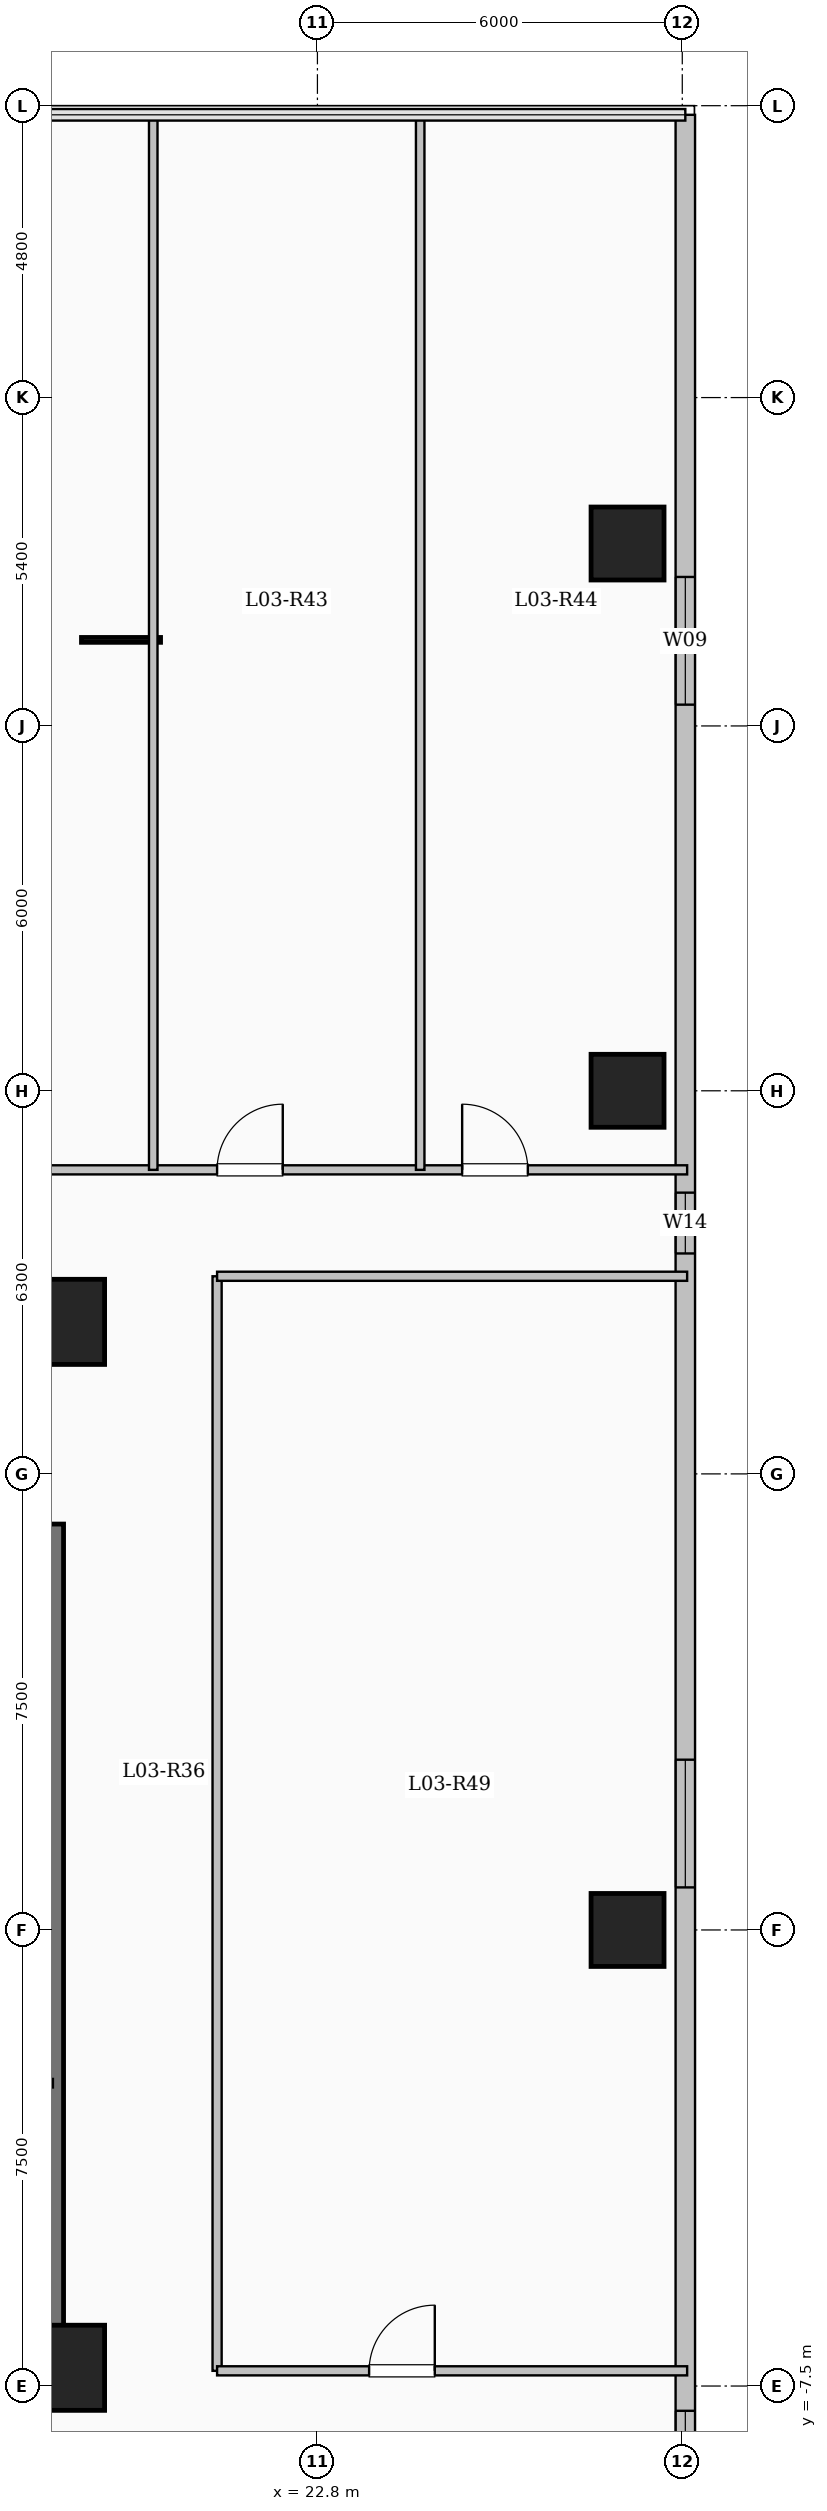
"""IFC4 building model, lengths in metres.
Left out: names, types, materials, properties, quantities, classifications, styles, units other than length and angle.
Written with IfcOpenShell. Run it as: python <this file> out.ifc"""

import sys

from ifc_helpers import new_model, si_unit, direction, frame, frame_2d, origin, origin_2d, place, context, subcontext, project, spatial, rectangle, extrude, element, fill, save


model = new_model("IFC4")
c1 = context("Model", 3, precision=1e-05, world=origin(), true_north=direction((0.0, 1.0)))
c2 = subcontext(c1, "Body", "Model", "MODEL_VIEW")
j1 = project(units=[si_unit("LENGTHUNIT", "METRE"), si_unit("PLANEANGLEUNIT", "RADIAN")], contexts=[c1])
p1 = place(None, origin())
s1 = spatial("IfcSite", under=j1, at=p1, CompositionType="ELEMENT")
p2 = place(p1, origin())
s2 = spatial("IfcBuilding", under=s1, at=p2, CompositionType="ELEMENT")
p3 = place(p2, frame((0.0, 0.0, 14.4)))
s3 = spatial("IfcBuildingStorey", under=s2, at=p3, CompositionType="ELEMENT", Elevation=14.4)
for number, where, z_axis, x_axis in (
    (1, (18.6, -7.2, 0.0), (0.0, 0.0, 1.0), (1.0, 0.0, 0.0)),
    (2, (18.6, 10.0, 0.0), (0.0, 0.0, 1.0), (1.0, 0.0, 0.0)),
):
    element("IfcColumn", number, at=place(p3, frame(where, z_axis=z_axis, x_axis=x_axis)), inside=s3, PredefinedType="COLUMN", context=c2, shape_type="SweptSolid", body=[
        extrude(rectangle(XDim=1.4, YDim=1.4, at=origin_2d()), origin(), (0.0, 0.0, 1.0), 4.5),
    ])
for number, where, z_axis, x_axis in (
    (3, (27.9, 22.8, 0.0), (0.0, 0.0, 1.0), (1.0, 0.0, 0.0)),
    (4, (27.9, 0.0, 0.0), (0.0, 0.0, 1.0), (1.0, 0.0, 0.0)),
    (5, (27.9, 13.8, 0.0), (0.0, 0.0, 1.0), (1.0, 0.0, 0.0)),
):
    element("IfcColumn", number, at=place(p3, frame(where, z_axis=z_axis, x_axis=x_axis)), inside=s3, PredefinedType="COLUMN", context=c2, shape_type="SweptSolid", body=[
        extrude(rectangle(XDim=1.2, YDim=1.2, at=origin_2d()), origin(), (0.0, 0.0, 1.0), 4.5),
    ])
p4 = place(p3, frame((28.85, 29.85, 0.0), z_axis=(0.0, 0.0, 1.0), x_axis=(0.0, -1.0, 0.0)))
e6 = element("IfcWall", 6, at=p4, inside=s3, PredefinedType="SOLIDWALL", context=c2, shape_type="SweptSolid", body=[
    extrude(rectangle(XDim=56.1, YDim=0.32, at=frame_2d((28.05, 0.0))), origin(), (0.0, 0.0, 1.0), 4.2),
])
p5 = place(p4, frame((7.6, 0.0, 0.9)))
e7 = element("IfcOpeningElement", 7, at=p5, cuts=e6, PredefinedType="OPENING", context=c2, shape_type="SweptSolid", body=[
    extrude(rectangle(XDim=2.1, YDim=2.0, at=frame_2d((1.05, 1.0))), frame((0.0, 0.17, 0.0), z_axis=(0.0, -1.0, 0.0), x_axis=(1.0, 0.0, 0.0)), (0.0, 0.0, 1.0), 0.34),
])
p6 = place(p4, frame((17.725, 0.0, 0.95)))
e8 = element("IfcOpeningElement", 8, at=p6, cuts=e6, PredefinedType="OPENING", context=c2, shape_type="SweptSolid", body=[
    extrude(rectangle(XDim=1.0, YDim=1.5, at=frame_2d((0.5, 0.75))), frame((0.0, 0.17, 0.0), z_axis=(0.0, -1.0, 0.0), x_axis=(1.0, 0.0, 0.0)), (0.0, 0.0, 1.0), 0.34),
])
p7 = place(p4, frame((27.05, 0.0, 0.9)))
e9 = element("IfcOpeningElement", 9, at=p7, cuts=e6, PredefinedType="OPENING", context=c2, shape_type="SweptSolid", body=[
    extrude(rectangle(XDim=2.1, YDim=2.0, at=frame_2d((1.05, 1.0))), frame((0.0, 0.17, 0.0), z_axis=(0.0, -1.0, 0.0), x_axis=(1.0, 0.0, 0.0)), (0.0, 0.0, 1.0), 0.34),
])
p8 = place(p4, frame((37.758, 0.0, 0.9)))
e10 = element("IfcOpeningElement", 10, at=p8, cuts=e6, PredefinedType="OPENING", context=c2, shape_type="SweptSolid", body=[
    extrude(rectangle(XDim=1.7, YDim=1.9, at=frame_2d((0.85, 0.95))), frame((0.0, 0.17, 0.0), z_axis=(0.0, -1.0, 0.0), x_axis=(1.0, 0.0, 0.0)), (0.0, 0.0, 1.0), 0.34),
])
p9 = place(p3, frame((18.45, -7.375, 0.0), z_axis=(0.0, 0.0, 1.0), x_axis=(0.0, 1.0, 0.0)))
e11 = element("IfcWall", 11, at=p9, inside=s3, PredefinedType="SHEAR", context=c2, shape_type="SweptSolid", body=[
    extrude(rectangle(XDim=14.05, YDim=0.35, at=frame_2d((7.025, 0.0))), origin(), (0.0, 0.0, 1.0), 4.5),
])
p10 = place(p3, frame((10.075, -7.2, 0.0), z_axis=(0.0, 0.0, 1.0), x_axis=(1.0, 0.0, 0.0)))
e12 = element("IfcWall", 12, at=p10, inside=s3, PredefinedType="SHEAR", context=c2, shape_type="SweptSolid", body=[
    extrude(rectangle(XDim=8.55, YDim=0.35, at=frame_2d((4.275, 0.0))), origin(), (0.0, 0.0, 1.0), 4.5),
])
p11 = place(p3, frame((3.85, 12.5, 0.0), z_axis=(0.0, 0.0, 1.0), x_axis=(1.0, 0.0, 0.0)))
e13 = element("IfcWall", 13, at=p11, inside=s3, PredefinedType="PARTITIONING", context=c2, shape_type="SweptSolid", body=[
    extrude(rectangle(XDim=25.03, YDim=0.15, at=frame_2d((12.515, 0.0))), origin(), (0.0, 0.0, 1.0), 4.2),
])
p12 = place(p11, frame((1.2, 0.0, 0.0)))
e14 = element("IfcOpeningElement", 14, at=p12, cuts=e13, PredefinedType="OPENING", context=c2, shape_type="SweptSolid", body=[
    extrude(rectangle(XDim=0.95, YDim=2.15, at=frame_2d((0.475, 1.075))), frame((0.0, 0.085, 0.0), z_axis=(0.0, -1.0, 0.0), x_axis=(1.0, 0.0, 0.0)), (0.0, 0.0, 1.0), 0.17),
])
p13 = place(p11, frame((4.6, 0.0, 0.0)))
e15 = element("IfcOpeningElement", 15, at=p13, cuts=e13, PredefinedType="OPENING", context=c2, shape_type="SweptSolid", body=[
    extrude(rectangle(XDim=0.95, YDim=2.15, at=frame_2d((0.475, 1.075))), frame((0.0, 0.085, 0.0), z_axis=(0.0, -1.0, 0.0), x_axis=(1.0, 0.0, 0.0)), (0.0, 0.0, 1.0), 0.17),
])
p14 = place(p11, frame((9.1, 0.0, 0.0)))
e16 = element("IfcOpeningElement", 16, at=p14, cuts=e13, PredefinedType="OPENING", context=c2, shape_type="SweptSolid", body=[
    extrude(rectangle(XDim=0.95, YDim=2.15, at=frame_2d((0.475, 1.075))), frame((0.0, 0.085, 0.0), z_axis=(0.0, -1.0, 0.0), x_axis=(1.0, 0.0, 0.0)), (0.0, 0.0, 1.0), 0.17),
])
p15 = place(p11, frame((17.3, 0.0, 0.0)))
e17 = element("IfcOpeningElement", 17, at=p15, cuts=e13, PredefinedType="OPENING", context=c2, shape_type="SweptSolid", body=[
    extrude(rectangle(XDim=1.08, YDim=2.15, at=frame_2d((0.54, 1.075))), frame((0.0, 0.085, 0.0), z_axis=(0.0, -1.0, 0.0), x_axis=(1.0, 0.0, 0.0)), (0.0, 0.0, 1.0), 0.17),
])
p16 = place(p11, frame((21.33, 0.0, 0.0)))
e18 = element("IfcOpeningElement", 18, at=p16, cuts=e13, PredefinedType="OPENING", context=c2, shape_type="SweptSolid", body=[
    extrude(rectangle(XDim=1.08, YDim=2.15, at=frame_2d((0.54, 1.075))), frame((0.0, 0.085, 0.0), z_axis=(0.0, -1.0, 0.0), x_axis=(1.0, 0.0, 0.0)), (0.0, 0.0, 1.0), 0.17),
])
p17 = place(p3, frame((21.15, -7.25, 0.0), z_axis=(0.0, 0.0, 1.0), x_axis=(0.0, 1.0, 0.0)))
e19 = element("IfcWall", 19, at=p17, inside=s3, PredefinedType="PARTITIONING", context=c2, shape_type="SweptSolid", body=[
    extrude(rectangle(XDim=18.0, YDim=0.15, at=frame_2d((9.0, 0.0))), origin(), (0.0, 0.0, 1.0), 4.2),
])
for number, where, z_axis, x_axis in (
    (20, (20.1, 12.5, 0.0), (0.0, 0.0, 1.0), (0.0, 1.0, 0.0)),
    (21, (24.49, 12.5, 0.0), (0.0, 0.0, 1.0), (0.0, 1.0, 0.0)),
):
    element("IfcWall", number, at=place(p3, frame(where, z_axis=z_axis, x_axis=x_axis)), inside=s3, PredefinedType="PARTITIONING", context=c2, shape_type="SweptSolid", body=[
        extrude(rectangle(XDim=17.38, YDim=0.14, at=frame_2d((8.69, 0.0))), origin(), (0.0, 0.0, 1.0), 4.2),
    ])
p18 = place(p3, frame((21.15, -7.25, 0.0), z_axis=(0.0, 0.0, 1.0), x_axis=(1.0, 0.0, 0.0)))
e22 = element("IfcWall", 22, at=p18, inside=s3, PredefinedType="PARTITIONING", context=c2, shape_type="SweptSolid", body=[
    extrude(rectangle(XDim=7.73, YDim=0.15, at=frame_2d((3.865, 0.0))), origin(), (0.0, 0.0, 1.0), 4.2),
])
p19 = place(p18, frame((2.5, 0.0, 0.0)))
e23 = element("IfcOpeningElement", 23, at=p19, cuts=e22, PredefinedType="OPENING", context=c2, shape_type="SweptSolid", body=[
    extrude(rectangle(XDim=1.08, YDim=2.15, at=frame_2d((0.54, 1.075))), frame((0.0, 0.085, 0.0), z_axis=(0.0, -1.0, 0.0), x_axis=(1.0, 0.0, 0.0)), (0.0, 0.0, 1.0), 0.17),
])
p20 = place(p3, frame((21.15, 10.75, 0.0), z_axis=(0.0, 0.0, 1.0), x_axis=(1.0, 0.0, 0.0)))
e24 = element("IfcWall", 24, at=p20, inside=s3, PredefinedType="PARTITIONING", context=c2, shape_type="SweptSolid", body=[
    extrude(rectangle(XDim=7.73, YDim=0.15, at=frame_2d((3.865, 0.0))), origin(), (0.0, 0.0, 1.0), 4.2),
])
p21 = place(p5, origin())
e25 = element("IfcWindow", 25, at=p21, inside=s3, PartitioningType="SINGLE_PANEL", PredefinedType="WINDOW", context=c2, shape_type="SweptSolid", body=[
    extrude(rectangle(XDim=2.1, YDim=2.0, at=frame_2d((1.05, 1.0))), frame((0.0, 0.03, 0.0), z_axis=(0.0, -1.0, 0.0), x_axis=(1.0, 0.0, 0.0)), (0.0, 0.0, 1.0), 0.06),
])
fill(e7, e25)
p22 = place(p6, origin())
e26 = element("IfcWindow", 26, at=p22, inside=s3, PartitioningType="SINGLE_PANEL", PredefinedType="WINDOW", context=c2, shape_type="SweptSolid", body=[
    extrude(rectangle(XDim=1.0, YDim=1.5, at=frame_2d((0.5, 0.75))), frame((0.0, 0.03, 0.0), z_axis=(0.0, -1.0, 0.0), x_axis=(1.0, 0.0, 0.0)), (0.0, 0.0, 1.0), 0.06),
])
fill(e8, e26)
p23 = place(p7, origin())
e27 = element("IfcWindow", 27, at=p23, inside=s3, PartitioningType="SINGLE_PANEL", PredefinedType="WINDOW", context=c2, shape_type="SweptSolid", body=[
    extrude(rectangle(XDim=2.1, YDim=2.0, at=frame_2d((1.05, 1.0))), frame((0.0, 0.03, 0.0), z_axis=(0.0, -1.0, 0.0), x_axis=(1.0, 0.0, 0.0)), (0.0, 0.0, 1.0), 0.06),
])
fill(e9, e27)
p24 = place(p8, origin())
e28 = element("IfcWindow", 28, at=p24, inside=s3, PartitioningType="SINGLE_PANEL", PredefinedType="WINDOW", context=c2, shape_type="SweptSolid", body=[
    extrude(rectangle(XDim=1.7, YDim=1.9, at=frame_2d((0.85, 0.95))), frame((0.0, 0.03, 0.0), z_axis=(0.0, -1.0, 0.0), x_axis=(1.0, 0.0, 0.0)), (0.0, 0.0, 1.0), 0.06),
])
fill(e10, e28)
p25 = place(p15, origin())
e29 = element("IfcDoor", 29, at=p25, inside=s3, OperationType="SINGLE_SWING_RIGHT", PredefinedType="DOOR", context=c2, shape_type="SweptSolid", body=[
    extrude(rectangle(XDim=1.08, YDim=2.15, at=frame_2d((0.54, 1.075))), frame((0.0, 0.025, 0.0), z_axis=(0.0, -1.0, 0.0), x_axis=(1.0, 0.0, 0.0)), (0.0, 0.0, 1.0), 0.05),
])
fill(e17, e29)
p26 = place(p16, origin())
e30 = element("IfcDoor", 30, at=p26, inside=s3, OperationType="SINGLE_SWING_LEFT", PredefinedType="DOOR", context=c2, shape_type="SweptSolid", body=[
    extrude(rectangle(XDim=1.08, YDim=2.15, at=frame_2d((0.54, 1.075))), frame((0.0, 0.025, 0.0), z_axis=(0.0, -1.0, 0.0), x_axis=(1.0, 0.0, 0.0)), (0.0, 0.0, 1.0), 0.05),
])
fill(e18, e30)
p27 = place(p19, origin())
e31 = element("IfcDoor", 31, at=p27, inside=s3, OperationType="SINGLE_SWING_RIGHT", PredefinedType="DOOR", context=c2, shape_type="SweptSolid", body=[
    extrude(rectangle(XDim=1.08, YDim=2.15, at=frame_2d((0.54, 1.075))), frame((0.0, 0.025, 0.0), z_axis=(0.0, -1.0, 0.0), x_axis=(1.0, 0.0, 0.0)), (0.0, 0.0, 1.0), 0.05),
])
fill(e23, e31)
save(model, sys.argv[1])
